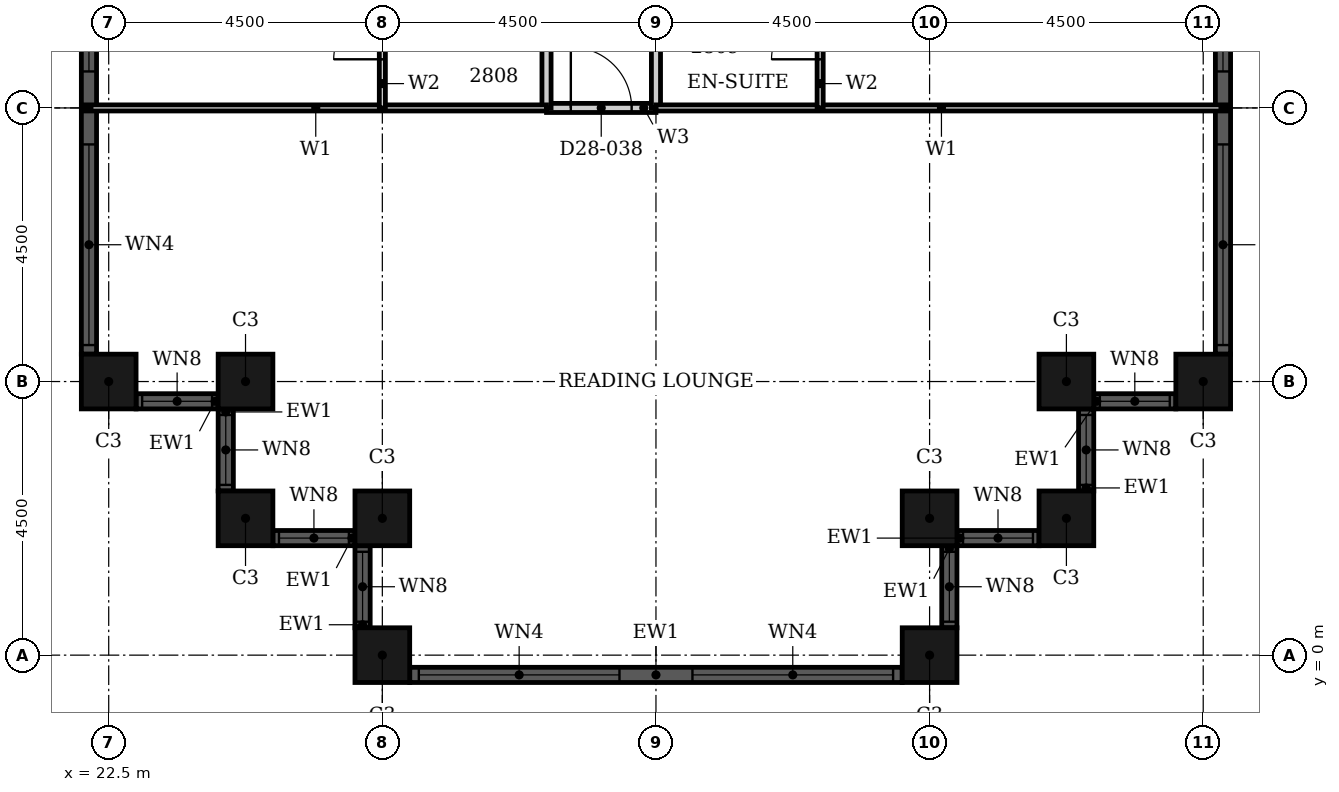
"""IFC4 building model, lengths in metres.
Left out: names, types, materials, properties, quantities, classifications, styles, units other than length and angle.
Written with IfcOpenShell. Run it as: python <this file> out.ifc"""

import sys

from ifc_helpers import new_model, si_unit, direction, frame, frame_2d, origin, origin_2d, place, context, subcontext, project, spatial, rectangle, hollow_rectangle, extrude, element, fill, save


model = new_model("IFC4")
c1 = context("Model", 3, precision=1e-05, world=origin(), true_north=direction((0.0, 1.0)))
c2 = subcontext(c1, "Body", "Model", "MODEL_VIEW")
j1 = project(units=[si_unit("LENGTHUNIT", "METRE"), si_unit("PLANEANGLEUNIT", "RADIAN")], contexts=[c1])
p1 = place(None, origin())
s1 = spatial("IfcSite", under=j1, at=p1, CompositionType="ELEMENT")
p2 = place(p1, origin())
s2 = spatial("IfcBuilding", under=s1, at=p2, CompositionType="ELEMENT")
p3 = place(p2, frame((0.0, 0.0, 115.2)))
s3 = spatial("IfcBuildingStorey", under=s2, at=p3, CompositionType="ELEMENT", Elevation=115.2)
for number, where, z_axis, x_axis in (
    (1, (22.5, 4.5, 0.0), (0.0, 0.0, 1.0), (1.0, 0.0, 0.0)),
    (2, (24.75, 4.5, 0.0), (0.0, 0.0, 1.0), (1.0, 0.0, 0.0)),
    (3, (24.75, 2.25, 0.0), (0.0, 0.0, 1.0), (1.0, 0.0, 0.0)),
    (4, (27.0, 2.25, 0.0), (0.0, 0.0, 1.0), (1.0, 0.0, 0.0)),
    (5, (27.0, 0.0, 0.0), (0.0, 0.0, 1.0), (1.0, 0.0, 0.0)),
    (6, (36.0, 0.0, 0.0), (0.0, 0.0, 1.0), (1.0, 0.0, 0.0)),
    (7, (36.0, 2.25, 0.0), (0.0, 0.0, 1.0), (1.0, 0.0, 0.0)),
    (8, (38.25, 2.25, 0.0), (0.0, 0.0, 1.0), (1.0, 0.0, 0.0)),
    (9, (38.25, 4.5, 0.0), (0.0, 0.0, 1.0), (1.0, 0.0, 0.0)),
    (10, (40.5, 4.5, 0.0), (0.0, 0.0, 1.0), (1.0, 0.0, 0.0)),
):
    element("IfcColumn", number, at=place(p3, frame(where, z_axis=z_axis, x_axis=x_axis)), inside=s3, PredefinedType="COLUMN", context=c2, shape_type="SweptSolid", body=[
        extrude(hollow_rectangle(XDim=0.9, YDim=0.9, WallThickness=0.028, at=origin_2d()), origin(), (0.0, 0.0, 1.0), 3.6),
    ])
p4 = place(p3, frame((22.95, 4.175, 0.0), z_axis=(0.0, 0.0, 1.0), x_axis=(1.0, 0.0, 0.0)))
e11 = element("IfcWall", 11, at=p4, inside=s3, PredefinedType="SOLIDWALL", context=c2, shape_type="SweptSolid", body=[
    extrude(rectangle(XDim=1.35, YDim=0.25, at=frame_2d((0.675, 0.0))), origin(), (0.0, 0.0, 1.0), 3.6),
])
p5 = place(p4, frame((0.1, 0.0, 0.9)))
e12 = element("IfcOpeningElement", 12, at=p5, cuts=e11, PredefinedType="OPENING", context=c2, shape_type="SweptSolid", body=[
    extrude(rectangle(XDim=1.15, YDim=2.08, at=frame_2d((0.575, 1.04))), frame((0.0, 0.135, 0.0), z_axis=(0.0, -1.0, 0.0), x_axis=(1.0, 0.0, 0.0)), (0.0, 0.0, 1.0), 0.27),
])
p6 = place(p3, frame((24.425, 4.05, 0.0), z_axis=(0.0, 0.0, 1.0), x_axis=(0.0, -1.0, 0.0)))
e13 = element("IfcWall", 13, at=p6, inside=s3, PredefinedType="SOLIDWALL", context=c2, shape_type="SweptSolid", body=[
    extrude(rectangle(XDim=1.35, YDim=0.25, at=frame_2d((0.675, 0.0))), origin(), (0.0, 0.0, 1.0), 3.6),
])
p7 = place(p6, frame((0.1, 0.0, 0.9)))
e14 = element("IfcOpeningElement", 14, at=p7, cuts=e13, PredefinedType="OPENING", context=c2, shape_type="SweptSolid", body=[
    extrude(rectangle(XDim=1.15, YDim=2.08, at=frame_2d((0.575, 1.04))), frame((0.0, 0.135, 0.0), z_axis=(0.0, -1.0, 0.0), x_axis=(1.0, 0.0, 0.0)), (0.0, 0.0, 1.0), 0.27),
])
p8 = place(p3, frame((25.2, 1.925, 0.0), z_axis=(0.0, 0.0, 1.0), x_axis=(1.0, 0.0, 0.0)))
e15 = element("IfcWall", 15, at=p8, inside=s3, PredefinedType="SOLIDWALL", context=c2, shape_type="SweptSolid", body=[
    extrude(rectangle(XDim=1.35, YDim=0.25, at=frame_2d((0.675, 0.0))), origin(), (0.0, 0.0, 1.0), 3.6),
])
p9 = place(p8, frame((0.1, 0.0, 0.9)))
e16 = element("IfcOpeningElement", 16, at=p9, cuts=e15, PredefinedType="OPENING", context=c2, shape_type="SweptSolid", body=[
    extrude(rectangle(XDim=1.15, YDim=2.08, at=frame_2d((0.575, 1.04))), frame((0.0, 0.135, 0.0), z_axis=(0.0, -1.0, 0.0), x_axis=(1.0, 0.0, 0.0)), (0.0, 0.0, 1.0), 0.27),
])
p10 = place(p3, frame((26.675, 1.8, 0.0), z_axis=(0.0, 0.0, 1.0), x_axis=(0.0, -1.0, 0.0)))
e17 = element("IfcWall", 17, at=p10, inside=s3, PredefinedType="SOLIDWALL", context=c2, shape_type="SweptSolid", body=[
    extrude(rectangle(XDim=1.35, YDim=0.25, at=frame_2d((0.675, 0.0))), origin(), (0.0, 0.0, 1.0), 3.6),
])
p11 = place(p10, frame((0.1, 0.0, 0.9)))
e18 = element("IfcOpeningElement", 18, at=p11, cuts=e17, PredefinedType="OPENING", context=c2, shape_type="SweptSolid", body=[
    extrude(rectangle(XDim=1.15, YDim=2.08, at=frame_2d((0.575, 1.04))), frame((0.0, 0.135, 0.0), z_axis=(0.0, -1.0, 0.0), x_axis=(1.0, 0.0, 0.0)), (0.0, 0.0, 1.0), 0.27),
])
p12 = place(p3, frame((27.45, -0.325, 0.0), z_axis=(0.0, 0.0, 1.0), x_axis=(1.0, 0.0, 0.0)))
e19 = element("IfcWall", 19, at=p12, inside=s3, PredefinedType="SOLIDWALL", context=c2, shape_type="SweptSolid", body=[
    extrude(rectangle(XDim=8.1, YDim=0.25, at=frame_2d((4.05, 0.0))), origin(), (0.0, 0.0, 1.0), 3.6),
])
p13 = place(p12, frame((0.15, 0.0, 0.9)))
e20 = element("IfcOpeningElement", 20, at=p13, cuts=e19, PredefinedType="OPENING", context=c2, shape_type="SweptSolid", body=[
    extrude(rectangle(XDim=3.3, YDim=2.08, at=frame_2d((1.65, 1.04))), frame((0.0, 0.135, 0.0), z_axis=(0.0, -1.0, 0.0), x_axis=(1.0, 0.0, 0.0)), (0.0, 0.0, 1.0), 0.27),
])
p14 = place(p12, frame((4.65, 0.0, 0.9)))
e21 = element("IfcOpeningElement", 21, at=p14, cuts=e19, PredefinedType="OPENING", context=c2, shape_type="SweptSolid", body=[
    extrude(rectangle(XDim=3.3, YDim=2.08, at=frame_2d((1.65, 1.04))), frame((0.0, 0.135, 0.0), z_axis=(0.0, -1.0, 0.0), x_axis=(1.0, 0.0, 0.0)), (0.0, 0.0, 1.0), 0.27),
])
p15 = place(p3, frame((36.325, 0.45, 0.0), z_axis=(0.0, 0.0, 1.0), x_axis=(0.0, 1.0, 0.0)))
e22 = element("IfcWall", 22, at=p15, inside=s3, PredefinedType="SOLIDWALL", context=c2, shape_type="SweptSolid", body=[
    extrude(rectangle(XDim=1.35, YDim=0.25, at=frame_2d((0.675, 0.0))), origin(), (0.0, 0.0, 1.0), 3.6),
])
p16 = place(p15, frame((0.1, 0.0, 0.9)))
e23 = element("IfcOpeningElement", 23, at=p16, cuts=e22, PredefinedType="OPENING", context=c2, shape_type="SweptSolid", body=[
    extrude(rectangle(XDim=1.15, YDim=2.08, at=frame_2d((0.575, 1.04))), frame((0.0, 0.135, 0.0), z_axis=(0.0, -1.0, 0.0), x_axis=(1.0, 0.0, 0.0)), (0.0, 0.0, 1.0), 0.27),
])
p17 = place(p3, frame((36.45, 1.925, 0.0), z_axis=(0.0, 0.0, 1.0), x_axis=(1.0, 0.0, 0.0)))
e24 = element("IfcWall", 24, at=p17, inside=s3, PredefinedType="SOLIDWALL", context=c2, shape_type="SweptSolid", body=[
    extrude(rectangle(XDim=1.35, YDim=0.25, at=frame_2d((0.675, 0.0))), origin(), (0.0, 0.0, 1.0), 3.6),
])
p18 = place(p17, frame((0.1, 0.0, 0.9)))
e25 = element("IfcOpeningElement", 25, at=p18, cuts=e24, PredefinedType="OPENING", context=c2, shape_type="SweptSolid", body=[
    extrude(rectangle(XDim=1.15, YDim=2.08, at=frame_2d((0.575, 1.04))), frame((0.0, 0.135, 0.0), z_axis=(0.0, -1.0, 0.0), x_axis=(1.0, 0.0, 0.0)), (0.0, 0.0, 1.0), 0.27),
])
p19 = place(p3, frame((38.575, 2.7, 0.0), z_axis=(0.0, 0.0, 1.0), x_axis=(0.0, 1.0, 0.0)))
e26 = element("IfcWall", 26, at=p19, inside=s3, PredefinedType="SOLIDWALL", context=c2, shape_type="SweptSolid", body=[
    extrude(rectangle(XDim=1.35, YDim=0.25, at=frame_2d((0.675, 0.0))), origin(), (0.0, 0.0, 1.0), 3.6),
])
p20 = place(p19, frame((0.1, 0.0, 0.9)))
e27 = element("IfcOpeningElement", 27, at=p20, cuts=e26, PredefinedType="OPENING", context=c2, shape_type="SweptSolid", body=[
    extrude(rectangle(XDim=1.15, YDim=2.08, at=frame_2d((0.575, 1.04))), frame((0.0, 0.135, 0.0), z_axis=(0.0, -1.0, 0.0), x_axis=(1.0, 0.0, 0.0)), (0.0, 0.0, 1.0), 0.27),
])
p21 = place(p3, frame((38.7, 4.175, 0.0), z_axis=(0.0, 0.0, 1.0), x_axis=(1.0, 0.0, 0.0)))
e28 = element("IfcWall", 28, at=p21, inside=s3, PredefinedType="SOLIDWALL", context=c2, shape_type="SweptSolid", body=[
    extrude(rectangle(XDim=1.35, YDim=0.25, at=frame_2d((0.675, 0.0))), origin(), (0.0, 0.0, 1.0), 3.6),
])
p22 = place(p21, frame((0.1, 0.0, 0.9)))
e29 = element("IfcOpeningElement", 29, at=p22, cuts=e28, PredefinedType="OPENING", context=c2, shape_type="SweptSolid", body=[
    extrude(rectangle(XDim=1.15, YDim=2.08, at=frame_2d((0.575, 1.04))), frame((0.0, 0.135, 0.0), z_axis=(0.0, -1.0, 0.0), x_axis=(1.0, 0.0, 0.0)), (0.0, 0.0, 1.0), 0.27),
])
p23 = place(p3, frame((40.825, 4.95, 0.0), z_axis=(0.0, 0.0, 1.0), x_axis=(0.0, 1.0, 0.0)))
e30 = element("IfcWall", 30, at=p23, inside=s3, PredefinedType="SOLIDWALL", context=c2, shape_type="SweptSolid", body=[
    extrude(rectangle(XDim=8.1, YDim=0.25, at=frame_2d((4.05, 0.0))), origin(), (0.0, 0.0, 1.0), 3.6),
])
p24 = place(p23, frame((0.15, 0.0, 0.9)))
e31 = element("IfcOpeningElement", 31, at=p24, cuts=e30, PredefinedType="OPENING", context=c2, shape_type="SweptSolid", body=[
    extrude(rectangle(XDim=3.3, YDim=2.08, at=frame_2d((1.65, 1.04))), frame((0.0, 0.135, 0.0), z_axis=(0.0, -1.0, 0.0), x_axis=(1.0, 0.0, 0.0)), (0.0, 0.0, 1.0), 0.27),
])
p25 = place(p23, frame((4.65, 0.0, 0.9)))
e32 = element("IfcOpeningElement", 32, at=p25, cuts=e30, PredefinedType="OPENING", context=c2, shape_type="SweptSolid", body=[
    extrude(rectangle(XDim=3.3, YDim=2.08, at=frame_2d((1.65, 1.04))), frame((0.0, 0.135, 0.0), z_axis=(0.0, -1.0, 0.0), x_axis=(1.0, 0.0, 0.0)), (0.0, 0.0, 1.0), 0.27),
])
p26 = place(p3, frame((22.175, 13.05, 0.0), z_axis=(0.0, 0.0, 1.0), x_axis=(0.0, -1.0, 0.0)))
e33 = element("IfcWall", 33, at=p26, inside=s3, PredefinedType="SOLIDWALL", context=c2, shape_type="SweptSolid", body=[
    extrude(rectangle(XDim=8.1, YDim=0.25, at=frame_2d((4.05, 0.0))), origin(), (0.0, 0.0, 1.0), 3.6),
])
p27 = place(p26, frame((0.15, 0.0, 0.9)))
e34 = element("IfcOpeningElement", 34, at=p27, cuts=e33, PredefinedType="OPENING", context=c2, shape_type="SweptSolid", body=[
    extrude(rectangle(XDim=3.3, YDim=2.08, at=frame_2d((1.65, 1.04))), frame((0.0, 0.135, 0.0), z_axis=(0.0, -1.0, 0.0), x_axis=(1.0, 0.0, 0.0)), (0.0, 0.0, 1.0), 0.27),
])
p28 = place(p26, frame((4.65, 0.0, 0.9)))
e35 = element("IfcOpeningElement", 35, at=p28, cuts=e33, PredefinedType="OPENING", context=c2, shape_type="SweptSolid", body=[
    extrude(rectangle(XDim=3.3, YDim=2.08, at=frame_2d((1.65, 1.04))), frame((0.0, 0.135, 0.0), z_axis=(0.0, -1.0, 0.0), x_axis=(1.0, 0.0, 0.0)), (0.0, 0.0, 1.0), 0.27),
])
p29 = place(p3, frame((29.7, 9.0, 0.0), z_axis=(0.0, 0.0, 1.0), x_axis=(1.0, 0.0, 0.0)))
e36 = element("IfcWall", 36, at=p29, inside=s3, PredefinedType="PARTITIONING", context=c2, shape_type="SweptSolid", body=[
    extrude(rectangle(XDim=1.8, YDim=0.15, at=frame_2d((0.9, 0.0))), origin(), (0.0, 0.0, 1.0), 3.3),
])
p30 = place(p29, frame((0.4, 0.0, 0.0)))
e37 = element("IfcOpeningElement", 37, at=p30, cuts=e36, PredefinedType="OPENING", context=c2, shape_type="SweptSolid", body=[
    extrude(rectangle(XDim=1.0, YDim=2.1, at=frame_2d((0.5, 1.05))), frame((0.0, 0.085, 0.0), z_axis=(0.0, -1.0, 0.0), x_axis=(1.0, 0.0, 0.0)), (0.0, 0.0, 1.0), 0.17),
])
p31 = place(p3, frame((29.7, 9.0, 0.0), z_axis=(0.0, 0.0, 1.0), x_axis=(0.0, 1.0, 0.0)))
e38 = element("IfcWall", 38, at=p31, inside=s3, PredefinedType="PARTITIONING", context=c2, shape_type="SweptSolid", body=[
    extrude(rectangle(XDim=11.7, YDim=0.15, at=frame_2d((5.85, 0.0))), origin(), (0.0, 0.0, 1.0), 3.3),
])
p32 = place(p31, frame((2.95, 0.0, 0.0)))
e39 = element("IfcOpeningElement", 39, at=p32, cuts=e38, PredefinedType="OPENING", context=c2, shape_type="SweptSolid", body=[
    extrude(rectangle(XDim=1.0, YDim=2.1, at=frame_2d((0.5, 1.05))), frame((0.0, 0.085, 0.0), z_axis=(0.0, -1.0, 0.0), x_axis=(1.0, 0.0, 0.0)), (0.0, 0.0, 1.0), 0.17),
])
p33 = place(p3, frame((31.5, 9.0, 0.0), z_axis=(0.0, 0.0, 1.0), x_axis=(0.0, 1.0, 0.0)))
e40 = element("IfcWall", 40, at=p33, inside=s3, PredefinedType="PARTITIONING", context=c2, shape_type="SweptSolid", body=[
    extrude(rectangle(XDim=11.7, YDim=0.15, at=frame_2d((5.85, 0.0))), origin(), (0.0, 0.0, 1.0), 2.58),
])
p34 = place(p33, frame((2.95, 0.0, 0.0)))
e41 = element("IfcOpeningElement", 41, at=p34, cuts=e40, PredefinedType="OPENING", context=c2, shape_type="SweptSolid", body=[
    extrude(rectangle(XDim=1.0, YDim=2.1, at=frame_2d((0.5, 1.05))), frame((0.0, 0.085, 0.0), z_axis=(0.0, -1.0, 0.0), x_axis=(1.0, 0.0, 0.0)), (0.0, 0.0, 1.0), 0.17),
])
p35 = place(p3, frame((31.5, 9.0, 0.0), z_axis=(0.0, 0.0, 1.0), x_axis=(1.0, 0.0, 0.0)))
e42 = element("IfcWall", 42, at=p35, inside=s3, PredefinedType="PARTITIONING", context=c2, shape_type="SweptSolid", body=[
    extrude(rectangle(XDim=9.39, YDim=0.1, at=frame_2d((4.695, 0.0))), origin(), (0.0, 0.0, 1.0), 3.3),
])
p36 = place(p3, frame((22.11, 9.0, 0.0), z_axis=(0.0, 0.0, 1.0), x_axis=(1.0, 0.0, 0.0)))
e43 = element("IfcWall", 43, at=p36, inside=s3, PredefinedType="PARTITIONING", context=c2, shape_type="SweptSolid", body=[
    extrude(rectangle(XDim=7.59, YDim=0.1, at=frame_2d((3.795, 0.0))), origin(), (0.0, 0.0, 1.0), 3.3),
])
p37 = place(p3, frame((27.0, 9.0, 0.0), z_axis=(0.0, 0.0, 1.0), x_axis=(0.0, 1.0, 0.0)))
e44 = element("IfcWall", 44, at=p37, inside=s3, PredefinedType="PARTITIONING", context=c2, shape_type="SweptSolid", body=[
    extrude(rectangle(XDim=2.4, YDim=0.1, at=frame_2d((1.2, 0.0))), origin(), (0.0, 0.0, 1.0), 2.58),
])
p38 = place(p37, frame((0.8, 0.0, 0.0)))
e45 = element("IfcOpeningElement", 45, at=p38, cuts=e44, PredefinedType="OPENING", context=c2, shape_type="SweptSolid", body=[
    extrude(rectangle(XDim=0.8, YDim=2.1, at=frame_2d((0.4, 1.05))), frame((0.0, 0.06, 0.0), z_axis=(0.0, -1.0, 0.0), x_axis=(1.0, 0.0, 0.0)), (0.0, 0.0, 1.0), 0.12),
])
p39 = place(p3, frame((34.2, 9.0, 0.0), z_axis=(0.0, 0.0, 1.0), x_axis=(0.0, 1.0, 0.0)))
e46 = element("IfcWall", 46, at=p39, inside=s3, PredefinedType="PARTITIONING", context=c2, shape_type="SweptSolid", body=[
    extrude(rectangle(XDim=2.4, YDim=0.1, at=frame_2d((1.2, 0.0))), origin(), (0.0, 0.0, 1.0), 3.3),
])
p40 = place(p39, frame((0.8, 0.0, 0.0)))
e47 = element("IfcOpeningElement", 47, at=p40, cuts=e46, PredefinedType="OPENING", context=c2, shape_type="SweptSolid", body=[
    extrude(rectangle(XDim=0.8, YDim=2.1, at=frame_2d((0.4, 1.05))), frame((0.0, 0.06, 0.0), z_axis=(0.0, -1.0, 0.0), x_axis=(1.0, 0.0, 0.0)), (0.0, 0.0, 1.0), 0.12),
])
p41 = place(p5, origin())
e48 = element("IfcWindow", 48, at=p41, inside=s3, PartitioningType="SINGLE_PANEL", PredefinedType="WINDOW", context=c2, shape_type="SweptSolid", body=[
    extrude(rectangle(XDim=1.15, YDim=2.08, at=frame_2d((0.575, 1.04))), frame((0.0, 0.03, 0.0), z_axis=(0.0, -1.0, 0.0), x_axis=(1.0, 0.0, 0.0)), (0.0, 0.0, 1.0), 0.06),
])
fill(e12, e48)
p42 = place(p7, origin())
e49 = element("IfcWindow", 49, at=p42, inside=s3, PartitioningType="SINGLE_PANEL", PredefinedType="WINDOW", context=c2, shape_type="SweptSolid", body=[
    extrude(rectangle(XDim=1.15, YDim=2.08, at=frame_2d((0.575, 1.04))), frame((0.0, 0.03, 0.0), z_axis=(0.0, -1.0, 0.0), x_axis=(1.0, 0.0, 0.0)), (0.0, 0.0, 1.0), 0.06),
])
fill(e14, e49)
p43 = place(p9, origin())
e50 = element("IfcWindow", 50, at=p43, inside=s3, PartitioningType="SINGLE_PANEL", PredefinedType="WINDOW", context=c2, shape_type="SweptSolid", body=[
    extrude(rectangle(XDim=1.15, YDim=2.08, at=frame_2d((0.575, 1.04))), frame((0.0, 0.03, 0.0), z_axis=(0.0, -1.0, 0.0), x_axis=(1.0, 0.0, 0.0)), (0.0, 0.0, 1.0), 0.06),
])
fill(e16, e50)
p44 = place(p11, origin())
e51 = element("IfcWindow", 51, at=p44, inside=s3, PartitioningType="SINGLE_PANEL", PredefinedType="WINDOW", context=c2, shape_type="SweptSolid", body=[
    extrude(rectangle(XDim=1.15, YDim=2.08, at=frame_2d((0.575, 1.04))), frame((0.0, 0.03, 0.0), z_axis=(0.0, -1.0, 0.0), x_axis=(1.0, 0.0, 0.0)), (0.0, 0.0, 1.0), 0.06),
])
fill(e18, e51)
p45 = place(p13, origin())
e52 = element("IfcWindow", 52, at=p45, inside=s3, PartitioningType="SINGLE_PANEL", PredefinedType="WINDOW", context=c2, shape_type="SweptSolid", body=[
    extrude(rectangle(XDim=3.3, YDim=2.08, at=frame_2d((1.65, 1.04))), frame((0.0, 0.03, 0.0), z_axis=(0.0, -1.0, 0.0), x_axis=(1.0, 0.0, 0.0)), (0.0, 0.0, 1.0), 0.06),
])
fill(e20, e52)
p46 = place(p14, origin())
e53 = element("IfcWindow", 53, at=p46, inside=s3, PartitioningType="SINGLE_PANEL", PredefinedType="WINDOW", context=c2, shape_type="SweptSolid", body=[
    extrude(rectangle(XDim=3.3, YDim=2.08, at=frame_2d((1.65, 1.04))), frame((0.0, 0.03, 0.0), z_axis=(0.0, -1.0, 0.0), x_axis=(1.0, 0.0, 0.0)), (0.0, 0.0, 1.0), 0.06),
])
fill(e21, e53)
p47 = place(p16, origin())
e54 = element("IfcWindow", 54, at=p47, inside=s3, PartitioningType="SINGLE_PANEL", PredefinedType="WINDOW", context=c2, shape_type="SweptSolid", body=[
    extrude(rectangle(XDim=1.15, YDim=2.08, at=frame_2d((0.575, 1.04))), frame((0.0, 0.03, 0.0), z_axis=(0.0, -1.0, 0.0), x_axis=(1.0, 0.0, 0.0)), (0.0, 0.0, 1.0), 0.06),
])
fill(e23, e54)
p48 = place(p18, origin())
e55 = element("IfcWindow", 55, at=p48, inside=s3, PartitioningType="SINGLE_PANEL", PredefinedType="WINDOW", context=c2, shape_type="SweptSolid", body=[
    extrude(rectangle(XDim=1.15, YDim=2.08, at=frame_2d((0.575, 1.04))), frame((0.0, 0.03, 0.0), z_axis=(0.0, -1.0, 0.0), x_axis=(1.0, 0.0, 0.0)), (0.0, 0.0, 1.0), 0.06),
])
fill(e25, e55)
p49 = place(p20, origin())
e56 = element("IfcWindow", 56, at=p49, inside=s3, PartitioningType="SINGLE_PANEL", PredefinedType="WINDOW", context=c2, shape_type="SweptSolid", body=[
    extrude(rectangle(XDim=1.15, YDim=2.08, at=frame_2d((0.575, 1.04))), frame((0.0, 0.03, 0.0), z_axis=(0.0, -1.0, 0.0), x_axis=(1.0, 0.0, 0.0)), (0.0, 0.0, 1.0), 0.06),
])
fill(e27, e56)
p50 = place(p22, origin())
e57 = element("IfcWindow", 57, at=p50, inside=s3, PartitioningType="SINGLE_PANEL", PredefinedType="WINDOW", context=c2, shape_type="SweptSolid", body=[
    extrude(rectangle(XDim=1.15, YDim=2.08, at=frame_2d((0.575, 1.04))), frame((0.0, 0.03, 0.0), z_axis=(0.0, -1.0, 0.0), x_axis=(1.0, 0.0, 0.0)), (0.0, 0.0, 1.0), 0.06),
])
fill(e29, e57)
p51 = place(p24, origin())
e58 = element("IfcWindow", 58, at=p51, inside=s3, PartitioningType="SINGLE_PANEL", PredefinedType="WINDOW", context=c2, shape_type="SweptSolid", body=[
    extrude(rectangle(XDim=3.3, YDim=2.08, at=frame_2d((1.65, 1.04))), frame((0.0, 0.03, 0.0), z_axis=(0.0, -1.0, 0.0), x_axis=(1.0, 0.0, 0.0)), (0.0, 0.0, 1.0), 0.06),
])
fill(e31, e58)
p52 = place(p25, origin())
e59 = element("IfcWindow", 59, at=p52, inside=s3, PartitioningType="SINGLE_PANEL", PredefinedType="WINDOW", context=c2, shape_type="SweptSolid", body=[
    extrude(rectangle(XDim=3.3, YDim=2.08, at=frame_2d((1.65, 1.04))), frame((0.0, 0.03, 0.0), z_axis=(0.0, -1.0, 0.0), x_axis=(1.0, 0.0, 0.0)), (0.0, 0.0, 1.0), 0.06),
])
fill(e32, e59)
p53 = place(p27, origin())
e60 = element("IfcWindow", 60, at=p53, inside=s3, PartitioningType="SINGLE_PANEL", PredefinedType="WINDOW", context=c2, shape_type="SweptSolid", body=[
    extrude(rectangle(XDim=3.3, YDim=2.08, at=frame_2d((1.65, 1.04))), frame((0.0, 0.03, 0.0), z_axis=(0.0, -1.0, 0.0), x_axis=(1.0, 0.0, 0.0)), (0.0, 0.0, 1.0), 0.06),
])
fill(e34, e60)
p54 = place(p28, origin())
e61 = element("IfcWindow", 61, at=p54, inside=s3, PartitioningType="SINGLE_PANEL", PredefinedType="WINDOW", context=c2, shape_type="SweptSolid", body=[
    extrude(rectangle(XDim=3.3, YDim=2.08, at=frame_2d((1.65, 1.04))), frame((0.0, 0.03, 0.0), z_axis=(0.0, -1.0, 0.0), x_axis=(1.0, 0.0, 0.0)), (0.0, 0.0, 1.0), 0.06),
])
fill(e35, e61)
p55 = place(p38, origin())
e62 = element("IfcDoor", 62, at=p55, inside=s3, OperationType="SINGLE_SWING_LEFT", PredefinedType="DOOR", context=c2, shape_type="SweptSolid", body=[
    extrude(rectangle(XDim=0.8, YDim=2.1, at=frame_2d((0.4, 1.05))), frame((0.0, 0.025, 0.0), z_axis=(0.0, -1.0, 0.0), x_axis=(1.0, 0.0, 0.0)), (0.0, 0.0, 1.0), 0.05),
])
fill(e45, e62)
p56 = place(p40, origin())
e63 = element("IfcDoor", 63, at=p56, inside=s3, OperationType="SINGLE_SWING_LEFT", PredefinedType="DOOR", context=c2, shape_type="SweptSolid", body=[
    extrude(rectangle(XDim=0.8, YDim=2.1, at=frame_2d((0.4, 1.05))), frame((0.0, 0.025, 0.0), z_axis=(0.0, -1.0, 0.0), x_axis=(1.0, 0.0, 0.0)), (0.0, 0.0, 1.0), 0.05),
])
fill(e47, e63)
p57 = place(p30, origin())
e64 = element("IfcDoor", 64, at=p57, inside=s3, OperationType="SINGLE_SWING_LEFT", PredefinedType="DOOR", context=c2, shape_type="SweptSolid", body=[
    extrude(rectangle(XDim=1.0, YDim=2.1, at=frame_2d((0.5, 1.05))), frame((0.0, 0.025, 0.0), z_axis=(0.0, -1.0, 0.0), x_axis=(1.0, 0.0, 0.0)), (0.0, 0.0, 1.0), 0.05),
])
fill(e37, e64)
save(model, sys.argv[1])
